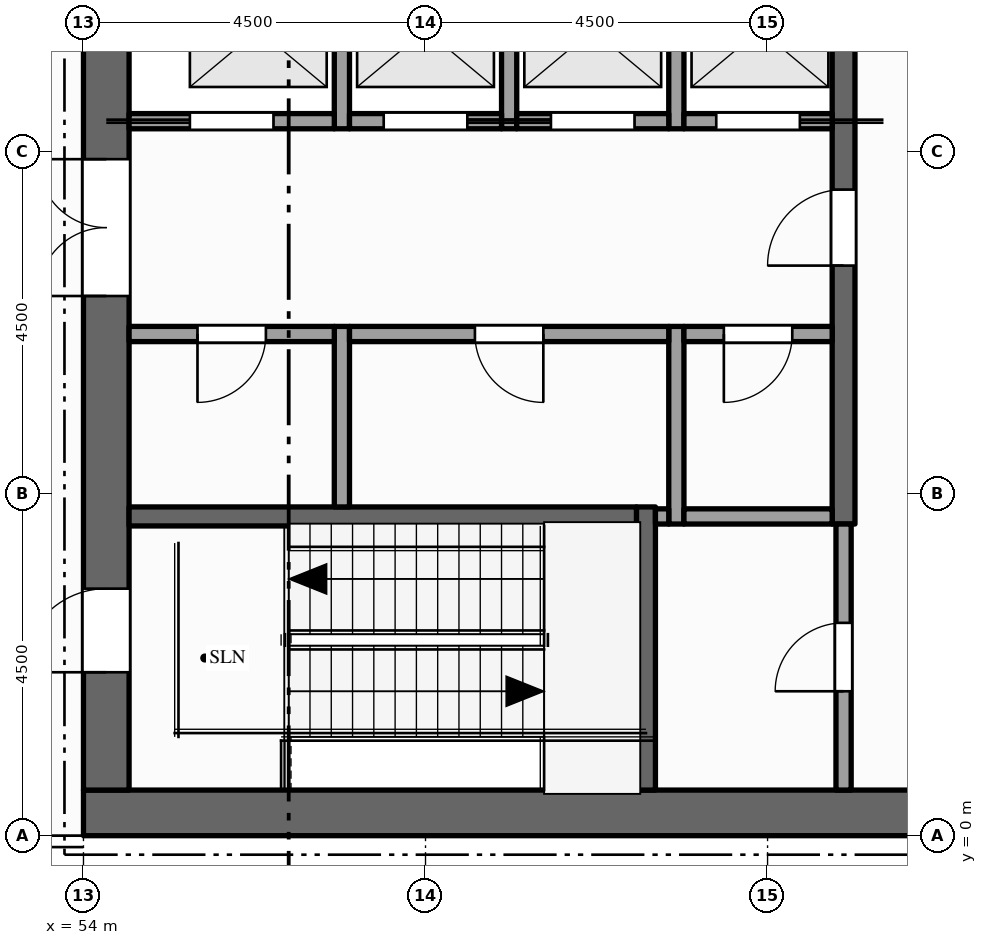
"""IFC4 building model, lengths in metres.
Left out: names, types, materials, properties, quantities, classifications, styles, units other than length and angle.
Written with IfcOpenShell. Run it as: python <this file> out.ifc"""

import sys

from ifc_helpers import new_model, si_unit, direction, frame, frame_2d, origin, place, context, subcontext, project, spatial, rectangle, extrude, element, fill, save


model = new_model("IFC4")
c1 = context("Model", 3, precision=1e-05, world=origin(), true_north=direction((0.0, 1.0)))
c2 = subcontext(c1, "Body", "Model", "MODEL_VIEW")
j1 = project(units=[si_unit("LENGTHUNIT", "METRE"), si_unit("PLANEANGLEUNIT", "RADIAN")], contexts=[c1])
p1 = place(None, origin())
s1 = spatial("IfcSite", under=j1, at=p1, CompositionType="ELEMENT")
p2 = place(p1, origin())
s2 = spatial("IfcBuilding", under=s1, at=p2, CompositionType="ELEMENT")
p3 = place(p2, frame((0.0, 0.0, 323.0)))
s3 = spatial("IfcBuildingStorey", under=s2, at=p3, CompositionType="ELEMENT", Elevation=323.0)
p4 = place(p3, frame((67.5, 0.3, -0.15), z_axis=(0.0, 0.0, 1.0), x_axis=(-1.0, 0.0, 0.0)))
e1 = element("IfcWall", 1, at=p4, inside=s3, PredefinedType="SHEAR", context=c2, shape_type="SweptSolid", body=[
    extrude(rectangle(XDim=13.5, YDim=0.6, at=frame_2d((6.75, 0.0))), origin(), (0.0, 0.0, 1.0), 4.5),
])
p5 = place(p3, frame((54.3, 0.6, -0.15), z_axis=(0.0, 0.0, 1.0), x_axis=(0.0, 1.0, 0.0)))
e2 = element("IfcWall", 2, at=p5, inside=s3, PredefinedType="SHEAR", context=c2, shape_type="SweptSolid", body=[
    extrude(rectangle(XDim=21.3, YDim=0.6, at=frame_2d((10.65, 0.0))), origin(), (0.0, 0.0, 1.0), 4.5),
])
p6 = place(p5, frame((6.5, 0.0, 0.15)))
e3 = element("IfcOpeningElement", 3, at=p6, cuts=e2, PredefinedType="OPENING", context=c2, shape_type="SweptSolid", body=[
    extrude(rectangle(XDim=1.8, YDim=2.1, at=frame_2d((0.9, 1.05))), frame((0.0, 0.31, 0.0), z_axis=(0.0, -1.0, 0.0), x_axis=(1.0, 0.0, 0.0)), (0.0, 0.0, 1.0), 0.62),
])
p7 = place(p5, frame((12.55, 0.0, 0.15)))
e4 = element("IfcOpeningElement", 4, at=p7, cuts=e2, PredefinedType="OPENING", context=c2, shape_type="SweptSolid", body=[
    extrude(rectangle(XDim=1.1, YDim=2.1, at=frame_2d((0.55, 1.05))), frame((0.0, 0.31, 0.0), z_axis=(0.0, -1.0, 0.0), x_axis=(1.0, 0.0, 0.0)), (0.0, 0.0, 1.0), 0.62),
])
p8 = place(p5, frame((1.55, 0.0, 0.15)))
e5 = element("IfcOpeningElement", 5, at=p8, cuts=e2, PredefinedType="OPENING", context=c2, shape_type="SweptSolid", body=[
    extrude(rectangle(XDim=1.1, YDim=2.1, at=frame_2d((0.55, 1.05))), frame((0.0, 0.31, 0.0), z_axis=(0.0, -1.0, 0.0), x_axis=(1.0, 0.0, 0.0)), (0.0, 0.0, 1.0), 0.62),
])
p9 = place(p5, frame((18.75, 0.0, 0.15)))
e6 = element("IfcOpeningElement", 6, at=p9, cuts=e2, PredefinedType="OPENING", context=c2, shape_type="SweptSolid", body=[
    extrude(rectangle(XDim=1.1, YDim=2.1, at=frame_2d((0.55, 1.05))), frame((0.0, 0.31, 0.0), z_axis=(0.0, -1.0, 0.0), x_axis=(1.0, 0.0, 0.0)), (0.0, 0.0, 1.0), 0.62),
])
p10 = place(p3, frame((57.4, 4.325, 0.0), z_axis=(0.0, 0.0, 1.0), x_axis=(0.0, 1.0, 0.0)))
e7 = element("IfcWall", 7, at=p10, inside=s3, PredefinedType="PARTITIONING", context=c2, shape_type="SweptSolid", body=[
    extrude(rectangle(XDim=2.375, YDim=0.2, at=frame_2d((1.188, 0.0))), origin(), (0.0, 0.0, 1.0), 4.35),
])
for number, where, z_axis, x_axis in (
    (8, (57.4, 9.3, 0.0), (0.0, 0.0, 1.0), (0.0, 1.0, 0.0)),
    (9, (59.6, 9.3, 0.0), (0.0, 0.0, 1.0), (0.0, 1.0, 0.0)),
):
    element("IfcWall", number, at=place(p3, frame(where, z_axis=z_axis, x_axis=x_axis)), inside=s3, PredefinedType="SOLIDWALL", context=c2, shape_type="SweptSolid", body=[
        extrude(rectangle(XDim=2.6, YDim=0.2, at=frame_2d((1.3, 0.0))), origin(), (0.0, 0.0, 1.0), 4.35),
    ])
p11 = place(p3, frame((61.4, 0.6, 0.0), z_axis=(0.0, 0.0, 1.0), x_axis=(0.0, 1.0, 0.0)))
e10 = element("IfcWall", 10, at=p11, inside=s3, PredefinedType="SHEAR", context=c2, shape_type="SweptSolid", body=[
    extrude(rectangle(XDim=3.725, YDim=0.25, at=frame_2d((1.862, 0.0))), origin(), (0.0, 0.0, 1.0), 4.35),
])
p12 = place(p3, frame((61.8, 4.1, 0.0), z_axis=(0.0, 0.0, 1.0), x_axis=(0.0, 1.0, 0.0)))
e11 = element("IfcWall", 11, at=p12, inside=s3, PredefinedType="PARTITIONING", context=c2, shape_type="SweptSolid", body=[
    extrude(rectangle(XDim=2.6, YDim=0.2, at=frame_2d((1.3, 0.0))), origin(), (0.0, 0.0, 1.0), 4.35),
])
p13 = place(p3, frame((61.8, 9.3, 0.0), z_axis=(0.0, 0.0, 1.0), x_axis=(0.0, 1.0, 0.0)))
e12 = element("IfcWall", 12, at=p13, inside=s3, PredefinedType="SOLIDWALL", context=c2, shape_type="SweptSolid", body=[
    extrude(rectangle(XDim=2.6, YDim=0.2, at=frame_2d((1.3, 0.0))), origin(), (0.0, 0.0, 1.0), 4.35),
])
p14 = place(p3, frame((64.0, 0.6, 0.0), z_axis=(0.0, 0.0, 1.0), x_axis=(0.0, 1.0, 0.0)))
e13 = element("IfcWall", 13, at=p14, inside=s3, PredefinedType="PARTITIONING", context=c2, shape_type="SweptSolid", body=[
    extrude(rectangle(XDim=3.5, YDim=0.2, at=frame_2d((1.75, 0.0))), origin(), (0.0, 0.0, 1.0), 4.35),
])
p15 = place(p14, frame((1.3, 0.0, 0.0)))
e14 = element("IfcOpeningElement", 14, at=p15, cuts=e13, PredefinedType="OPENING", context=c2, shape_type="SweptSolid", body=[
    extrude(rectangle(XDim=0.9, YDim=2.1, at=frame_2d((0.45, 1.05))), frame((0.0, 0.11, 0.0), z_axis=(0.0, -1.0, 0.0), x_axis=(1.0, 0.0, 0.0)), (0.0, 0.0, 1.0), 0.22),
])
p16 = place(p3, frame((64.0, 4.1, 0.0), z_axis=(0.0, 0.0, 1.0), x_axis=(0.0, 1.0, 0.0)))
e15 = element("IfcWall", 15, at=p16, inside=s3, PredefinedType="SHEAR", context=c2, shape_type="SweptSolid", body=[
    extrude(rectangle(XDim=14.5, YDim=0.3, at=frame_2d((7.25, 0.0))), origin(), (0.0, 0.0, 1.0), 4.35),
])
p17 = place(p16, frame((3.4, 0.0, 0.0)))
e16 = element("IfcOpeningElement", 16, at=p17, cuts=e15, PredefinedType="OPENING", context=c2, shape_type="SweptSolid", body=[
    extrude(rectangle(XDim=1.0, YDim=2.1, at=frame_2d((0.5, 1.05))), frame((0.0, 0.16, 0.0), z_axis=(0.0, -1.0, 0.0), x_axis=(1.0, 0.0, 0.0)), (0.0, 0.0, 1.0), 0.32),
])
p18 = place(p16, frame((9.1, 0.0, 0.0)))
e17 = element("IfcOpeningElement", 17, at=p18, cuts=e15, PredefinedType="OPENING", context=c2, shape_type="SweptSolid", body=[
    extrude(rectangle(XDim=1.0, YDim=2.1, at=frame_2d((0.5, 1.05))), frame((0.0, 0.16, 0.0), z_axis=(0.0, -1.0, 0.0), x_axis=(1.0, 0.0, 0.0)), (0.0, 0.0, 1.0), 0.32),
])
p19 = place(p3, frame((54.6, 4.2, 0.0), z_axis=(0.0, 0.0, 1.0), x_axis=(1.0, 0.0, 0.0)))
e18 = element("IfcWall", 18, at=p19, inside=s3, PredefinedType="SHEAR", context=c2, shape_type="SweptSolid", body=[
    extrude(rectangle(XDim=6.675, YDim=0.25, at=frame_2d((3.337, 0.0))), origin(), (0.0, 0.0, 1.0), 4.35),
])
p20 = place(p3, frame((61.525, 4.2, 0.0), z_axis=(0.0, 0.0, 1.0), x_axis=(1.0, 0.0, 0.0)))
e19 = element("IfcWall", 19, at=p20, inside=s3, PredefinedType="PARTITIONING", context=c2, shape_type="SweptSolid", body=[
    extrude(rectangle(XDim=0.175, YDim=0.2, at=frame_2d((0.087, 0.0))), origin(), (0.0, 0.0, 1.0), 4.35),
])
p21 = place(p3, frame((61.9, 4.2, 0.0), z_axis=(0.0, 0.0, 1.0), x_axis=(1.0, 0.0, 0.0)))
e20 = element("IfcWall", 20, at=p21, inside=s3, PredefinedType="PARTITIONING", context=c2, shape_type="SweptSolid", body=[
    extrude(rectangle(XDim=1.95, YDim=0.2, at=frame_2d((0.975, 0.0))), origin(), (0.0, 0.0, 1.0), 4.35),
])
p22 = place(p3, frame((54.6, 6.6, 0.0), z_axis=(0.0, 0.0, 1.0), x_axis=(1.0, 0.0, 0.0)))
e21 = element("IfcWall", 21, at=p22, inside=s3, PredefinedType="PARTITIONING", context=c2, shape_type="SweptSolid", body=[
    extrude(rectangle(XDim=2.7, YDim=0.2, at=frame_2d((1.35, 0.0))), origin(), (0.0, 0.0, 1.0), 4.35),
])
p23 = place(p22, frame((0.9, 0.0, 0.0)))
e22 = element("IfcOpeningElement", 22, at=p23, cuts=e21, PredefinedType="OPENING", context=c2, shape_type="SweptSolid", body=[
    extrude(rectangle(XDim=0.9, YDim=2.1, at=frame_2d((0.45, 1.05))), frame((0.0, 0.11, 0.0), z_axis=(0.0, -1.0, 0.0), x_axis=(1.0, 0.0, 0.0)), (0.0, 0.0, 1.0), 0.22),
])
p24 = place(p3, frame((57.5, 6.6, 0.0), z_axis=(0.0, 0.0, 1.0), x_axis=(1.0, 0.0, 0.0)))
e23 = element("IfcWall", 23, at=p24, inside=s3, PredefinedType="PARTITIONING", context=c2, shape_type="SweptSolid", body=[
    extrude(rectangle(XDim=4.2, YDim=0.2, at=frame_2d((2.1, 0.0))), origin(), (0.0, 0.0, 1.0), 4.35),
])
p25 = place(p24, frame((1.65, 0.0, 0.0)))
e24 = element("IfcOpeningElement", 24, at=p25, cuts=e23, PredefinedType="OPENING", context=c2, shape_type="SweptSolid", body=[
    extrude(rectangle(XDim=0.9, YDim=2.1, at=frame_2d((0.45, 1.05))), frame((0.0, 0.11, 0.0), z_axis=(0.0, -1.0, 0.0), x_axis=(1.0, 0.0, 0.0)), (0.0, 0.0, 1.0), 0.22),
])
p26 = place(p3, frame((61.9, 6.6, 0.0), z_axis=(0.0, 0.0, 1.0), x_axis=(1.0, 0.0, 0.0)))
e25 = element("IfcWall", 25, at=p26, inside=s3, PredefinedType="PARTITIONING", context=c2, shape_type="SweptSolid", body=[
    extrude(rectangle(XDim=1.95, YDim=0.2, at=frame_2d((0.975, 0.0))), origin(), (0.0, 0.0, 1.0), 4.35),
])
p27 = place(p26, frame((0.525, 0.0, 0.0)))
e26 = element("IfcOpeningElement", 26, at=p27, cuts=e25, PredefinedType="OPENING", context=c2, shape_type="SweptSolid", body=[
    extrude(rectangle(XDim=0.9, YDim=2.1, at=frame_2d((0.45, 1.05))), frame((0.0, 0.11, 0.0), z_axis=(0.0, -1.0, 0.0), x_axis=(1.0, 0.0, 0.0)), (0.0, 0.0, 1.0), 0.22),
])
p28 = place(p3, frame((54.6, 9.4, 0.0), z_axis=(0.0, 0.0, 1.0), x_axis=(1.0, 0.0, 0.0)))
e27 = element("IfcWall", 27, at=p28, inside=s3, PredefinedType="SOLIDWALL", context=c2, shape_type="SweptSolid", body=[
    extrude(rectangle(XDim=2.7, YDim=0.2, at=frame_2d((1.35, 0.0))), origin(), (0.0, 0.0, 1.0), 4.35),
])
p29 = place(p28, frame((0.8, 0.0, 0.012)))
e28 = element("IfcOpeningElement", 28, at=p29, cuts=e27, PredefinedType="OPENING", context=c2, shape_type="SweptSolid", body=[
    extrude(rectangle(XDim=1.1, YDim=2.1, at=frame_2d((0.55, 1.05))), frame((0.0, 0.11, 0.0), z_axis=(0.0, -1.0, 0.0), x_axis=(1.0, 0.0, 0.0)), (0.0, 0.0, 1.0), 0.22),
])
p30 = place(p3, frame((57.5, 9.4, 0.0), z_axis=(0.0, 0.0, 1.0), x_axis=(1.0, 0.0, 0.0)))
e29 = element("IfcWall", 29, at=p30, inside=s3, PredefinedType="SOLIDWALL", context=c2, shape_type="SweptSolid", body=[
    extrude(rectangle(XDim=2.0, YDim=0.2, at=frame_2d((1.0, 0.0))), origin(), (0.0, 0.0, 1.0), 4.35),
])
p31 = place(p30, frame((0.45, 0.0, 0.012)))
e30 = element("IfcOpeningElement", 30, at=p31, cuts=e29, PredefinedType="OPENING", context=c2, shape_type="SweptSolid", body=[
    extrude(rectangle(XDim=1.1, YDim=2.1, at=frame_2d((0.55, 1.05))), frame((0.0, 0.11, 0.0), z_axis=(0.0, -1.0, 0.0), x_axis=(1.0, 0.0, 0.0)), (0.0, 0.0, 1.0), 0.22),
])
p32 = place(p3, frame((59.7, 9.4, 0.0), z_axis=(0.0, 0.0, 1.0), x_axis=(1.0, 0.0, 0.0)))
e31 = element("IfcWall", 31, at=p32, inside=s3, PredefinedType="SOLIDWALL", context=c2, shape_type="SweptSolid", body=[
    extrude(rectangle(XDim=2.0, YDim=0.2, at=frame_2d((1.0, 0.0))), origin(), (0.0, 0.0, 1.0), 4.35),
])
p33 = place(p32, frame((0.45, 0.0, 0.012)))
e32 = element("IfcOpeningElement", 32, at=p33, cuts=e31, PredefinedType="OPENING", context=c2, shape_type="SweptSolid", body=[
    extrude(rectangle(XDim=1.1, YDim=2.1, at=frame_2d((0.55, 1.05))), frame((0.0, 0.11, 0.0), z_axis=(0.0, -1.0, 0.0), x_axis=(1.0, 0.0, 0.0)), (0.0, 0.0, 1.0), 0.22),
])
p34 = place(p3, frame((61.9, 9.4, 0.0), z_axis=(0.0, 0.0, 1.0), x_axis=(1.0, 0.0, 0.0)))
e33 = element("IfcWall", 33, at=p34, inside=s3, PredefinedType="SOLIDWALL", context=c2, shape_type="SweptSolid", body=[
    extrude(rectangle(XDim=1.95, YDim=0.2, at=frame_2d((0.975, 0.0))), origin(), (0.0, 0.0, 1.0), 4.35),
])
p35 = place(p34, frame((0.425, 0.0, 0.012)))
e34 = element("IfcOpeningElement", 34, at=p35, cuts=e33, PredefinedType="OPENING", context=c2, shape_type="SweptSolid", body=[
    extrude(rectangle(XDim=1.1, YDim=2.1, at=frame_2d((0.55, 1.05))), frame((0.0, 0.11, 0.0), z_axis=(0.0, -1.0, 0.0), x_axis=(1.0, 0.0, 0.0)), (0.0, 0.0, 1.0), 0.22),
])
p36 = place(p29, origin())
e35 = element("IfcDoor", 35, at=p36, inside=s3, OperationType="SLIDING_TO_LEFT", PredefinedType="DOOR", context=c2, shape_type="SweptSolid", body=[
    extrude(rectangle(XDim=1.1, YDim=2.1, at=frame_2d((0.55, 1.05))), frame((0.0, 0.025, 0.0), z_axis=(0.0, -1.0, 0.0), x_axis=(1.0, 0.0, 0.0)), (0.0, 0.0, 1.0), 0.05),
])
fill(e28, e35)
p37 = place(p31, origin())
e36 = element("IfcDoor", 36, at=p37, inside=s3, OperationType="SLIDING_TO_RIGHT", PredefinedType="DOOR", context=c2, shape_type="SweptSolid", body=[
    extrude(rectangle(XDim=1.1, YDim=2.1, at=frame_2d((0.55, 1.05))), frame((0.0, 0.025, 0.0), z_axis=(0.0, -1.0, 0.0), x_axis=(1.0, 0.0, 0.0)), (0.0, 0.0, 1.0), 0.05),
])
fill(e30, e36)
p38 = place(p33, origin())
e37 = element("IfcDoor", 37, at=p38, inside=s3, OperationType="SLIDING_TO_LEFT", PredefinedType="DOOR", context=c2, shape_type="SweptSolid", body=[
    extrude(rectangle(XDim=1.1, YDim=2.1, at=frame_2d((0.55, 1.05))), frame((0.0, 0.025, 0.0), z_axis=(0.0, -1.0, 0.0), x_axis=(1.0, 0.0, 0.0)), (0.0, 0.0, 1.0), 0.05),
])
fill(e32, e37)
p39 = place(p35, origin())
e38 = element("IfcDoor", 38, at=p39, inside=s3, OperationType="SLIDING_TO_RIGHT", PredefinedType="DOOR", context=c2, shape_type="SweptSolid", body=[
    extrude(rectangle(XDim=1.1, YDim=2.1, at=frame_2d((0.55, 1.05))), frame((0.0, 0.025, 0.0), z_axis=(0.0, -1.0, 0.0), x_axis=(1.0, 0.0, 0.0)), (0.0, 0.0, 1.0), 0.05),
])
fill(e34, e38)
p40 = place(p6, origin())
e39 = element("IfcDoor", 39, at=p40, inside=s3, OperationType="DOUBLE_DOOR_SINGLE_SWING", PredefinedType="DOOR", context=c2, shape_type="SweptSolid", body=[
    extrude(rectangle(XDim=1.8, YDim=2.1, at=frame_2d((0.9, 1.05))), frame((0.0, 0.025, 0.0), z_axis=(0.0, -1.0, 0.0), x_axis=(1.0, 0.0, 0.0)), (0.0, 0.0, 1.0), 0.05),
])
fill(e3, e39)
p41 = place(p17, origin())
e40 = element("IfcDoor", 40, at=p41, inside=s3, OperationType="SINGLE_SWING_LEFT", PredefinedType="DOOR", context=c2, shape_type="SweptSolid", body=[
    extrude(rectangle(XDim=1.0, YDim=2.1, at=frame_2d((0.5, 1.05))), frame((0.0, 0.025, 0.0), z_axis=(0.0, -1.0, 0.0), x_axis=(1.0, 0.0, 0.0)), (0.0, 0.0, 1.0), 0.05),
])
fill(e16, e40)
p42 = place(p8, origin())
e41 = element("IfcDoor", 41, at=p42, inside=s3, OperationType="SINGLE_SWING_LEFT", PredefinedType="DOOR", context=c2, shape_type="SweptSolid", body=[
    extrude(rectangle(XDim=1.1, YDim=2.1, at=frame_2d((0.55, 1.05))), frame((0.0, 0.025, 0.0), z_axis=(0.0, -1.0, 0.0), x_axis=(1.0, 0.0, 0.0)), (0.0, 0.0, 1.0), 0.05),
])
fill(e5, e41)
p43 = place(p15, origin())
e42 = element("IfcDoor", 42, at=p43, inside=s3, OperationType="SINGLE_SWING_LEFT", PredefinedType="DOOR", context=c2, shape_type="SweptSolid", body=[
    extrude(rectangle(XDim=0.9, YDim=2.1, at=frame_2d((0.45, 1.05))), frame((0.0, 0.025, 0.0), z_axis=(0.0, -1.0, 0.0), x_axis=(1.0, 0.0, 0.0)), (0.0, 0.0, 1.0), 0.05),
])
fill(e14, e42)
p44 = place(p23, origin())
e43 = element("IfcDoor", 43, at=p44, inside=s3, OperationType="SINGLE_SWING_LEFT", PredefinedType="DOOR", context=c2, shape_type="SweptSolid", body=[
    extrude(rectangle(XDim=0.9, YDim=2.1, at=frame_2d((0.45, 1.05))), frame((0.0, 0.025, 0.0), z_axis=(0.0, -1.0, 0.0), x_axis=(1.0, 0.0, 0.0)), (0.0, 0.0, 1.0), 0.05),
])
fill(e22, e43)
p45 = place(p25, origin())
e44 = element("IfcDoor", 44, at=p45, inside=s3, OperationType="SINGLE_SWING_RIGHT", PredefinedType="DOOR", context=c2, shape_type="SweptSolid", body=[
    extrude(rectangle(XDim=0.9, YDim=2.1, at=frame_2d((0.45, 1.05))), frame((0.0, 0.025, 0.0), z_axis=(0.0, -1.0, 0.0), x_axis=(1.0, 0.0, 0.0)), (0.0, 0.0, 1.0), 0.05),
])
fill(e24, e44)
p46 = place(p27, origin())
e45 = element("IfcDoor", 45, at=p46, inside=s3, OperationType="SINGLE_SWING_LEFT", PredefinedType="DOOR", context=c2, shape_type="SweptSolid", body=[
    extrude(rectangle(XDim=0.9, YDim=2.1, at=frame_2d((0.45, 1.05))), frame((0.0, 0.025, 0.0), z_axis=(0.0, -1.0, 0.0), x_axis=(1.0, 0.0, 0.0)), (0.0, 0.0, 1.0), 0.05),
])
fill(e26, e45)
save(model, sys.argv[1])
